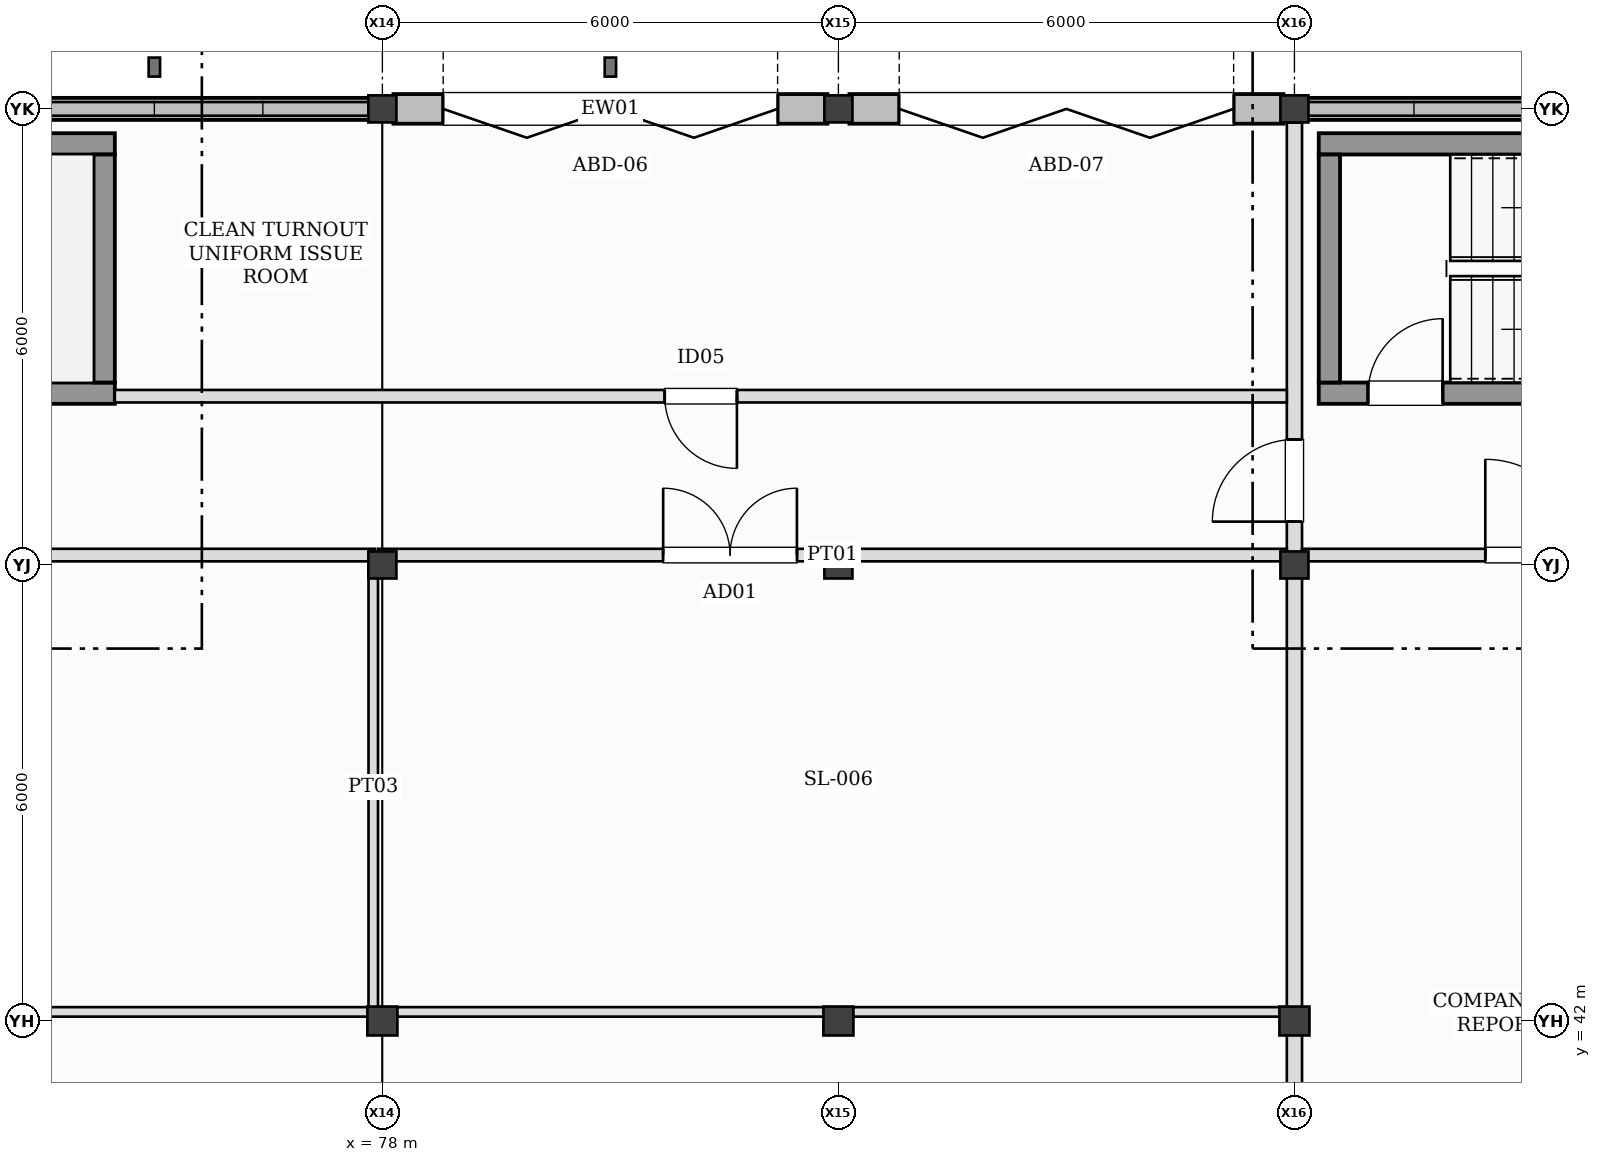
"""IFC4 building model, lengths in metres.
Left out: names, types, materials, properties, quantities, classifications, styles, units other than length and angle.
Written with IfcOpenShell. Run it as: python <this file> out.ifc"""

import sys

from ifc_helpers import new_model, si_unit, direction, frame, frame_2d, origin, origin_2d, place, context, subcontext, project, spatial, rectangle, hollow_rectangle, i_section, extrude, element, fill, save


model = new_model("IFC4")
c1 = context("Model", 3, precision=1e-05, world=origin(), true_north=direction((0.0, 1.0)))
c2 = subcontext(c1, "Body", "Model", "MODEL_VIEW")
j1 = project(units=[si_unit("LENGTHUNIT", "METRE"), si_unit("PLANEANGLEUNIT", "RADIAN")], contexts=[c1])
p1 = place(None, origin())
s1 = spatial("IfcSite", under=j1, at=p1, CompositionType="ELEMENT")
p2 = place(p1, origin())
s2 = spatial("IfcBuilding", under=s1, at=p2, CompositionType="ELEMENT")
p3 = place(p2, origin())
s3 = spatial("IfcBuildingStorey", under=s2, at=p3, CompositionType="ELEMENT", Elevation=0.0)
p4 = place(p3, frame((78.0, 42.0, -0.41), z_axis=(0.0, 0.0, 1.0), x_axis=(1.0, 0.0, 0.0)))
e1 = element("IfcColumn", 1, at=p4, inside=s3, PredefinedType="COLUMN", context=c2, shape_type="SweptSolid", body=[
    extrude(i_section(OverallWidth=0.395, OverallDepth=0.38, WebThickness=0.019, FlangeThickness=0.03, at=origin_2d()), origin(), (0.0, 0.0, 1.0), 6.41),
])
for number, where, z_axis, x_axis in (
    (2, (78.0, 48.0, -0.41), (0.0, 0.0, 1.0), (1.0, 0.0, 0.0)),
    (3, (78.0, 54.0, -0.41), (0.0, 0.0, 1.0), (1.0, 0.0, 0.0)),
):
    element("IfcColumn", number, at=place(p3, frame(where, z_axis=z_axis, x_axis=x_axis)), inside=s3, PredefinedType="COLUMN", context=c2, shape_type="SweptSolid", body=[
        extrude(i_section(OverallWidth=0.369, OverallDepth=0.356, WebThickness=0.011, FlangeThickness=0.018, at=origin_2d()), origin(), (0.0, 0.0, 1.0), 6.41),
    ])
p5 = place(p3, frame((84.0, 42.0, -0.41), z_axis=(0.0, 0.0, 1.0), x_axis=(1.0, 0.0, 0.0)))
e4 = element("IfcColumn", 4, at=p5, inside=s3, PredefinedType="COLUMN", context=c2, shape_type="SweptSolid", body=[
    extrude(i_section(OverallWidth=0.395, OverallDepth=0.38, WebThickness=0.019, FlangeThickness=0.03, at=origin_2d()), origin(), (0.0, 0.0, 1.0), 6.41),
])
for number, where, z_axis, x_axis in (
    (5, (84.0, 48.0, -0.41), (0.0, 0.0, 1.0), (1.0, 0.0, 0.0)),
    (6, (84.0, 54.0, -0.41), (0.0, 0.0, 1.0), (1.0, 0.0, 0.0)),
):
    element("IfcColumn", number, at=place(p3, frame(where, z_axis=z_axis, x_axis=x_axis)), inside=s3, PredefinedType="COLUMN", context=c2, shape_type="SweptSolid", body=[
        extrude(i_section(OverallWidth=0.369, OverallDepth=0.356, WebThickness=0.011, FlangeThickness=0.018, at=origin_2d()), origin(), (0.0, 0.0, 1.0), 6.41),
    ])
p6 = place(p3, frame((90.0, 42.0, -0.41), z_axis=(0.0, 0.0, 1.0), x_axis=(1.0, 0.0, 0.0)))
e7 = element("IfcColumn", 7, at=p6, inside=s3, PredefinedType="COLUMN", context=c2, shape_type="SweptSolid", body=[
    extrude(i_section(OverallWidth=0.395, OverallDepth=0.38, WebThickness=0.019, FlangeThickness=0.03, at=origin_2d()), origin(), (0.0, 0.0, 1.0), 6.41),
])
for number, where, z_axis, x_axis in (
    (8, (90.0, 48.0, -0.41), (0.0, 0.0, 1.0), (1.0, 0.0, 0.0)),
    (9, (90.0, 54.0, -0.41), (0.0, 0.0, 1.0), (1.0, 0.0, 0.0)),
):
    element("IfcColumn", number, at=place(p3, frame(where, z_axis=z_axis, x_axis=x_axis)), inside=s3, PredefinedType="COLUMN", context=c2, shape_type="SweptSolid", body=[
        extrude(i_section(OverallWidth=0.369, OverallDepth=0.356, WebThickness=0.011, FlangeThickness=0.018, at=origin_2d()), origin(), (0.0, 0.0, 1.0), 6.41),
    ])
for number, where, z_axis, x_axis in (
    (10, (75.0, 54.55, -0.35), (0.0, 0.0, 1.0), (1.0, 0.0, 0.0)),
    (11, (81.0, 54.55, -0.35), (0.0, 0.0, 1.0), (1.0, 0.0, 0.0)),
):
    element("IfcColumn", number, at=place(p3, frame(where, z_axis=z_axis, x_axis=x_axis)), inside=s3, PredefinedType="PILASTER", context=c2, shape_type="SweptSolid", body=[
        extrude(hollow_rectangle(XDim=0.15, YDim=0.25, WallThickness=0.008, at=origin_2d()), origin(), (0.0, 0.0, 1.0), 6.35),
    ])
p7 = place(p3, frame((77.855, 54.0, 0.0), z_axis=(0.0, 0.0, 1.0), x_axis=(-1.0, 0.0, 0.0)))
e12 = element("IfcWall", 12, at=p7, inside=s3, PredefinedType="STANDARD", context=c2, shape_type="SweptSolid", body=[
    extrude(rectangle(XDim=5.71, YDim=0.29, at=frame_2d((2.855, 0.0))), origin(), (0.0, 0.0, 1.0), 0.44),
])
p8 = place(p3, frame((83.855, 54.0, 0.0), z_axis=(0.0, 0.0, 1.0), x_axis=(-1.0, 0.0, 0.0)))
e13 = element("IfcWall", 13, at=p8, inside=s3, PredefinedType="STANDARD", context=c2, shape_type="SweptSolid", body=[
    extrude(rectangle(XDim=5.71, YDim=0.39, at=frame_2d((2.855, 0.0))), origin(), (0.0, 0.0, 1.0), 5.035),
])
p9 = place(p8, frame((0.655, 0.0, 0.0)))
e14 = element("IfcOpeningElement", 14, at=p9, cuts=e13, PredefinedType="OPENING", context=c2, shape_type="SweptSolid", body=[
    extrude(rectangle(XDim=4.4, YDim=4.55, at=frame_2d((2.2, 2.275))), frame((0.0, 0.205, 0.0), z_axis=(0.0, -1.0, 0.0), x_axis=(1.0, 0.0, 0.0)), (0.0, 0.0, 1.0), 0.41),
])
p10 = place(p3, frame((89.855, 54.0, 0.0), z_axis=(0.0, 0.0, 1.0), x_axis=(-1.0, 0.0, 0.0)))
e15 = element("IfcWall", 15, at=p10, inside=s3, PredefinedType="STANDARD", context=c2, shape_type="SweptSolid", body=[
    extrude(rectangle(XDim=5.71, YDim=0.39, at=frame_2d((2.855, 0.0))), origin(), (0.0, 0.0, 1.0), 5.035),
])
p11 = place(p10, frame((0.655, 0.0, 0.0)))
e16 = element("IfcOpeningElement", 16, at=p11, cuts=e15, PredefinedType="OPENING", context=c2, shape_type="SweptSolid", body=[
    extrude(rectangle(XDim=4.4, YDim=4.55, at=frame_2d((2.2, 2.275))), frame((0.0, 0.205, 0.0), z_axis=(0.0, -1.0, 0.0), x_axis=(1.0, 0.0, 0.0)), (0.0, 0.0, 1.0), 0.41),
])
p12 = place(p3, frame((95.855, 54.0, 0.0), z_axis=(0.0, 0.0, 1.0), x_axis=(-1.0, 0.0, 0.0)))
e17 = element("IfcWall", 17, at=p12, inside=s3, PredefinedType="STANDARD", context=c2, shape_type="SweptSolid", body=[
    extrude(rectangle(XDim=5.71, YDim=0.29, at=frame_2d((2.855, 0.0))), origin(), (0.0, 0.0, 1.0), 0.92),
])
p13 = place(p3, frame((90.32, 50.26, 0.0), z_axis=(0.0, 0.0, 1.0), x_axis=(1.0, 0.0, 0.0)))
e18 = element("IfcWall", 18, at=p13, inside=s3, PredefinedType="SHEAR", context=c2, shape_type="SweptSolid", body=[
    extrude(rectangle(XDim=8.16, YDim=0.28, at=frame_2d((4.08, 0.0))), origin(), (0.0, 0.0, 1.0), 6.0),
])
p14 = place(p13, frame((0.65, 0.0, 0.0)))
e19 = element("IfcOpeningElement", 19, at=p14, cuts=e18, PredefinedType="OPENING", context=c2, shape_type="SweptSolid", body=[
    extrude(rectangle(XDim=0.98, YDim=2.15, at=frame_2d((0.49, 1.075))), frame((0.0, 0.15, 0.0), z_axis=(0.0, -1.0, 0.0), x_axis=(1.0, 0.0, 0.0)), (0.0, 0.0, 1.0), 0.3),
])
p15 = place(p3, frame((98.48, 53.54, 0.0), z_axis=(0.0, 0.0, 1.0), x_axis=(-1.0, 0.0, 0.0)))
e20 = element("IfcWall", 20, at=p15, inside=s3, PredefinedType="SHEAR", context=c2, shape_type="SweptSolid", body=[
    extrude(rectangle(XDim=8.16, YDim=0.28, at=frame_2d((4.08, 0.0))), origin(), (0.0, 0.0, 1.0), 6.0),
])
p16 = place(p3, frame((90.46, 53.4, 0.0), z_axis=(0.0, 0.0, 1.0), x_axis=(0.0, -1.0, 0.0)))
e21 = element("IfcWall", 21, at=p16, inside=s3, PredefinedType="SHEAR", context=c2, shape_type="SweptSolid", body=[
    extrude(rectangle(XDim=3.0, YDim=0.28, at=frame_2d((1.5, 0.0))), origin(), (0.0, 0.0, 1.0), 6.0),
])
p17 = place(p3, frame((66.32, 50.26, 0.0), z_axis=(0.0, 0.0, 1.0), x_axis=(1.0, 0.0, 0.0)))
e22 = element("IfcWall", 22, at=p17, inside=s3, PredefinedType="SHEAR", context=c2, shape_type="SweptSolid", body=[
    extrude(rectangle(XDim=8.16, YDim=0.28, at=frame_2d((4.08, 0.0))), origin(), (0.0, 0.0, 1.0), 6.0),
])
p18 = place(p17, frame((0.65, 0.0, 0.0)))
e23 = element("IfcOpeningElement", 23, at=p18, cuts=e22, PredefinedType="OPENING", context=c2, shape_type="SweptSolid", body=[
    extrude(rectangle(XDim=0.98, YDim=2.15, at=frame_2d((0.49, 1.075))), frame((0.0, 0.15, 0.0), z_axis=(0.0, -1.0, 0.0), x_axis=(1.0, 0.0, 0.0)), (0.0, 0.0, 1.0), 0.3),
])
p19 = place(p3, frame((74.48, 53.54, 0.0), z_axis=(0.0, 0.0, 1.0), x_axis=(-1.0, 0.0, 0.0)))
e24 = element("IfcWall", 24, at=p19, inside=s3, PredefinedType="SHEAR", context=c2, shape_type="SweptSolid", body=[
    extrude(rectangle(XDim=8.16, YDim=0.28, at=frame_2d((4.08, 0.0))), origin(), (0.0, 0.0, 1.0), 6.0),
])
p20 = place(p3, frame((74.34, 50.4, 0.0), z_axis=(0.0, 0.0, 1.0), x_axis=(0.0, 1.0, 0.0)))
e25 = element("IfcWall", 25, at=p20, inside=s3, PredefinedType="SHEAR", context=c2, shape_type="SweptSolid", body=[
    extrude(rectangle(XDim=3.0, YDim=0.28, at=frame_2d((1.5, 0.0))), origin(), (0.0, 0.0, 1.0), 6.0),
])
p21 = place(p3, frame((90.0, 36.18, 0.0), z_axis=(0.0, 0.0, 1.0), x_axis=(0.0, 1.0, 0.0)))
e26 = element("IfcWall", 26, at=p21, inside=s3, PredefinedType="PARTITIONING", context=c2, shape_type="SweptSolid", body=[
    extrude(rectangle(XDim=5.64, YDim=0.2, at=frame_2d((2.82, 0.0))), origin(), (0.0, 0.0, 1.0), 4.959),
])
p22 = place(p3, frame((90.0, 42.18, 0.0), z_axis=(0.0, 0.0, 1.0), x_axis=(0.0, 1.0, 0.0)))
e27 = element("IfcWall", 27, at=p22, inside=s3, PredefinedType="PARTITIONING", context=c2, shape_type="SweptSolid", body=[
    extrude(rectangle(XDim=5.72, YDim=0.2, at=frame_2d((2.86, 0.0))), origin(), (0.0, 0.0, 1.0), 5.044),
])
p23 = place(p3, frame((90.0, 48.05, 0.0), z_axis=(0.0, 0.0, 1.0), x_axis=(0.0, 1.0, 0.0)))
e28 = element("IfcWall", 28, at=p23, inside=s3, PredefinedType="PARTITIONING", context=c2, shape_type="SweptSolid", body=[
    extrude(rectangle(XDim=5.77, YDim=0.2, at=frame_2d((2.885, 0.0))), origin(), (0.0, 0.0, 1.0), 5.044),
])
p24 = place(p23, frame((0.52, 0.0, 0.0)))
e29 = element("IfcOpeningElement", 29, at=p24, cuts=e28, PredefinedType="OPENING", context=c2, shape_type="SweptSolid", body=[
    extrude(rectangle(XDim=1.08, YDim=2.14, at=frame_2d((0.54, 1.07))), frame((0.0, 0.11, 0.0), z_axis=(0.0, -1.0, 0.0), x_axis=(1.0, 0.0, 0.0)), (0.0, 0.0, 1.0), 0.22),
])
p25 = place(p3, frame((65.98, 48.13, 0.0), z_axis=(0.0, 0.0, 1.0), x_axis=(1.0, 0.0, 0.0)))
e30 = element("IfcWall", 30, at=p25, inside=s3, PredefinedType="PARTITIONING", context=c2, shape_type="SweptSolid", body=[
    extrude(rectangle(XDim=11.923, YDim=0.165, at=frame_2d((5.961, 0.0))), origin(), (0.0, 0.0, 1.0), 5.035),
])
p26 = place(p25, frame((3.973, 0.0, 0.0)))
e31 = element("IfcOpeningElement", 31, at=p26, cuts=e30, PredefinedType="OPENING", context=c2, shape_type="SweptSolid", body=[
    extrude(rectangle(XDim=1.06, YDim=2.25, at=frame_2d((0.53, 1.125))), frame((0.0, 0.093, 0.0), z_axis=(0.0, -1.0, 0.0), x_axis=(1.0, 0.0, 0.0)), (0.0, 0.0, 1.0), 0.185),
])
p27 = place(p3, frame((77.88, 48.05, 0.0), z_axis=(0.0, 0.0, 1.0), x_axis=(0.0, -1.0, 0.0)))
e32 = element("IfcWall", 32, at=p27, inside=s3, PredefinedType="PARTITIONING", context=c2, shape_type="SweptSolid", body=[
    extrude(rectangle(XDim=5.933, YDim=0.125, at=frame_2d((2.966, 0.0))), origin(), (0.0, 0.0, 1.0), 5.044),
])
p28 = place(p3, frame((77.817, 42.12, 0.0), z_axis=(0.0, 0.0, 1.0), x_axis=(-1.0, 0.0, 0.0)))
e33 = element("IfcWall", 33, at=p28, inside=s3, PredefinedType="PARTITIONING", context=c2, shape_type="SweptSolid", body=[
    extrude(rectangle(XDim=11.837, YDim=0.125, at=frame_2d((5.919, 0.0))), origin(), (0.0, 0.0, 1.0), 5.035),
])
p29 = place(p3, frame((77.942, 48.13, 0.0), z_axis=(0.0, 0.0, 1.0), x_axis=(1.0, 0.0, 0.0)))
e34 = element("IfcWall", 34, at=p29, inside=s3, PredefinedType="PARTITIONING", context=c2, shape_type="SweptSolid", body=[
    extrude(rectangle(XDim=11.958, YDim=0.165, at=frame_2d((5.979, 0.0))), origin(), (0.0, 0.0, 1.0), 5.035),
])
p30 = place(p29, frame((3.752, 0.0, 0.0)))
e35 = element("IfcOpeningElement", 35, at=p30, cuts=e34, PredefinedType="OPENING", context=c2, shape_type="SweptSolid", body=[
    extrude(rectangle(XDim=1.76, YDim=2.26, at=frame_2d((0.88, 1.13))), frame((0.0, 0.093, 0.0), z_axis=(0.0, -1.0, 0.0), x_axis=(1.0, 0.0, 0.0)), (0.0, 0.0, 1.0), 0.185),
])
p31 = place(p3, frame((89.9, 42.12, 0.0), z_axis=(0.0, 0.0, 1.0), x_axis=(-1.0, 0.0, 0.0)))
e36 = element("IfcWall", 36, at=p31, inside=s3, PredefinedType="PARTITIONING", context=c2, shape_type="SweptSolid", body=[
    extrude(rectangle(XDim=11.958, YDim=0.125, at=frame_2d((5.979, 0.0))), origin(), (0.0, 0.0, 1.0), 5.035),
])
p32 = place(p3, frame((89.9, 50.22, 0.0), z_axis=(0.0, 0.0, 1.0), x_axis=(-1.0, 0.0, 0.0)))
e37 = element("IfcWall", 37, at=p32, inside=s3, PredefinedType="PARTITIONING", context=c2, shape_type="SweptSolid", body=[
    extrude(rectangle(XDim=15.42, YDim=0.165, at=frame_2d((7.71, 0.0))), origin(), (0.0, 0.0, 1.0), 5.68),
])
p33 = place(p32, frame((7.235, 0.0, 0.0)))
e38 = element("IfcOpeningElement", 38, at=p33, cuts=e37, PredefinedType="OPENING", context=c2, shape_type="SweptSolid", body=[
    extrude(rectangle(XDim=0.95, YDim=2.12, at=frame_2d((0.475, 1.06))), frame((0.0, 0.093, 0.0), z_axis=(0.0, -1.0, 0.0), x_axis=(1.0, 0.0, 0.0)), (0.0, 0.0, 1.0), 0.185),
])
p34 = place(p3, frame((90.1, 48.13, 0.0), z_axis=(0.0, 0.0, 1.0), x_axis=(1.0, 0.0, 0.0)))
e39 = element("IfcWall", 39, at=p34, inside=s3, PredefinedType="PARTITIONING", context=c2, shape_type="SweptSolid", body=[
    extrude(rectangle(XDim=6.083, YDim=0.165, at=frame_2d((3.041, 0.0))), origin(), (0.0, 0.0, 1.0), 5.035),
])
p35 = place(p34, frame((2.411, 0.0, 0.0)))
e40 = element("IfcOpeningElement", 40, at=p35, cuts=e39, PredefinedType="OPENING", context=c2, shape_type="SweptSolid", body=[
    extrude(rectangle(XDim=1.26, YDim=2.2, at=frame_2d((0.63, 1.1))), frame((0.0, 0.093, 0.0), z_axis=(0.0, -1.0, 0.0), x_axis=(1.0, 0.0, 0.0)), (0.0, 0.0, 1.0), 0.185),
])
p36 = place(p9, frame((4.4, 0.0, 0.0), z_axis=(0.0, 0.0, 1.0), x_axis=(-1.0, 0.0, 0.0)))
e41 = element("IfcDoor", 41, at=p36, inside=s3, OperationType="FOLDING_TO_LEFT", PredefinedType="DOOR", context=c2, shape_type="SweptSolid", body=[
    extrude(rectangle(XDim=4.4, YDim=4.55, at=frame_2d((2.2, 2.275))), frame((0.0, 0.025, 0.0), z_axis=(0.0, -1.0, 0.0), x_axis=(1.0, 0.0, 0.0)), (0.0, 0.0, 1.0), 0.05),
])
fill(e14, e41)
p37 = place(p11, frame((4.4, 0.0, 0.0), z_axis=(0.0, 0.0, 1.0), x_axis=(-1.0, 0.0, 0.0)))
e42 = element("IfcDoor", 42, at=p37, inside=s3, OperationType="FOLDING_TO_LEFT", PredefinedType="DOOR", context=c2, shape_type="SweptSolid", body=[
    extrude(rectangle(XDim=4.4, YDim=4.55, at=frame_2d((2.2, 2.275))), frame((0.0, 0.025, 0.0), z_axis=(0.0, -1.0, 0.0), x_axis=(1.0, 0.0, 0.0)), (0.0, 0.0, 1.0), 0.05),
])
fill(e16, e42)
p38 = place(p14, origin())
e43 = element("IfcDoor", 43, at=p38, inside=s3, OperationType="SINGLE_SWING_RIGHT", PredefinedType="DOOR", context=c2, shape_type="SweptSolid", body=[
    extrude(rectangle(XDim=0.98, YDim=2.15, at=frame_2d((0.49, 1.075))), frame((0.0, 0.025, 0.0), z_axis=(0.0, -1.0, 0.0), x_axis=(1.0, 0.0, 0.0)), (0.0, 0.0, 1.0), 0.05),
])
fill(e19, e43)
p39 = place(p24, frame((1.08, 0.0, 0.0), z_axis=(0.0, 0.0, 1.0), x_axis=(-1.0, 0.0, 0.0)))
e44 = element("IfcDoor", 44, at=p39, inside=s3, OperationType="SINGLE_SWING_LEFT", PredefinedType="DOOR", context=c2, shape_type="SweptSolid", body=[
    extrude(rectangle(XDim=1.08, YDim=2.14, at=frame_2d((0.54, 1.07))), frame((0.0, 0.025, 0.0), z_axis=(0.0, -1.0, 0.0), x_axis=(1.0, 0.0, 0.0)), (0.0, 0.0, 1.0), 0.05),
])
fill(e29, e44)
p40 = place(p30, frame((1.76, 0.0, 0.0), z_axis=(0.0, 0.0, 1.0), x_axis=(-1.0, 0.0, 0.0)))
e45 = element("IfcDoor", 45, at=p40, inside=s3, OperationType="DOUBLE_DOOR_SINGLE_SWING", PredefinedType="DOOR", context=c2, shape_type="SweptSolid", body=[
    extrude(rectangle(XDim=1.76, YDim=2.26, at=frame_2d((0.88, 1.13))), frame((0.0, 0.025, 0.0), z_axis=(0.0, -1.0, 0.0), x_axis=(1.0, 0.0, 0.0)), (0.0, 0.0, 1.0), 0.05),
])
fill(e35, e45)
p41 = place(p33, frame((0.95, 0.0, 0.0), z_axis=(0.0, 0.0, 1.0), x_axis=(-1.0, 0.0, 0.0)))
e46 = element("IfcDoor", 46, at=p41, inside=s3, OperationType="SINGLE_SWING_LEFT", PredefinedType="DOOR", context=c2, shape_type="SweptSolid", body=[
    extrude(rectangle(XDim=0.95, YDim=2.12, at=frame_2d((0.475, 1.06))), frame((0.0, 0.025, 0.0), z_axis=(0.0, -1.0, 0.0), x_axis=(1.0, 0.0, 0.0)), (0.0, 0.0, 1.0), 0.05),
])
fill(e38, e46)
p42 = place(p35, frame((1.26, 0.0, 0.0), z_axis=(0.0, 0.0, 1.0), x_axis=(-1.0, 0.0, 0.0)))
e47 = element("IfcDoor", 47, at=p42, inside=s3, OperationType="SINGLE_SWING_LEFT", PredefinedType="DOOR", context=c2, shape_type="SweptSolid", body=[
    extrude(rectangle(XDim=1.26, YDim=2.2, at=frame_2d((0.63, 1.1))), frame((0.0, 0.025, 0.0), z_axis=(0.0, -1.0, 0.0), x_axis=(1.0, 0.0, 0.0)), (0.0, 0.0, 1.0), 0.05),
])
fill(e40, e47)
save(model, sys.argv[1])
